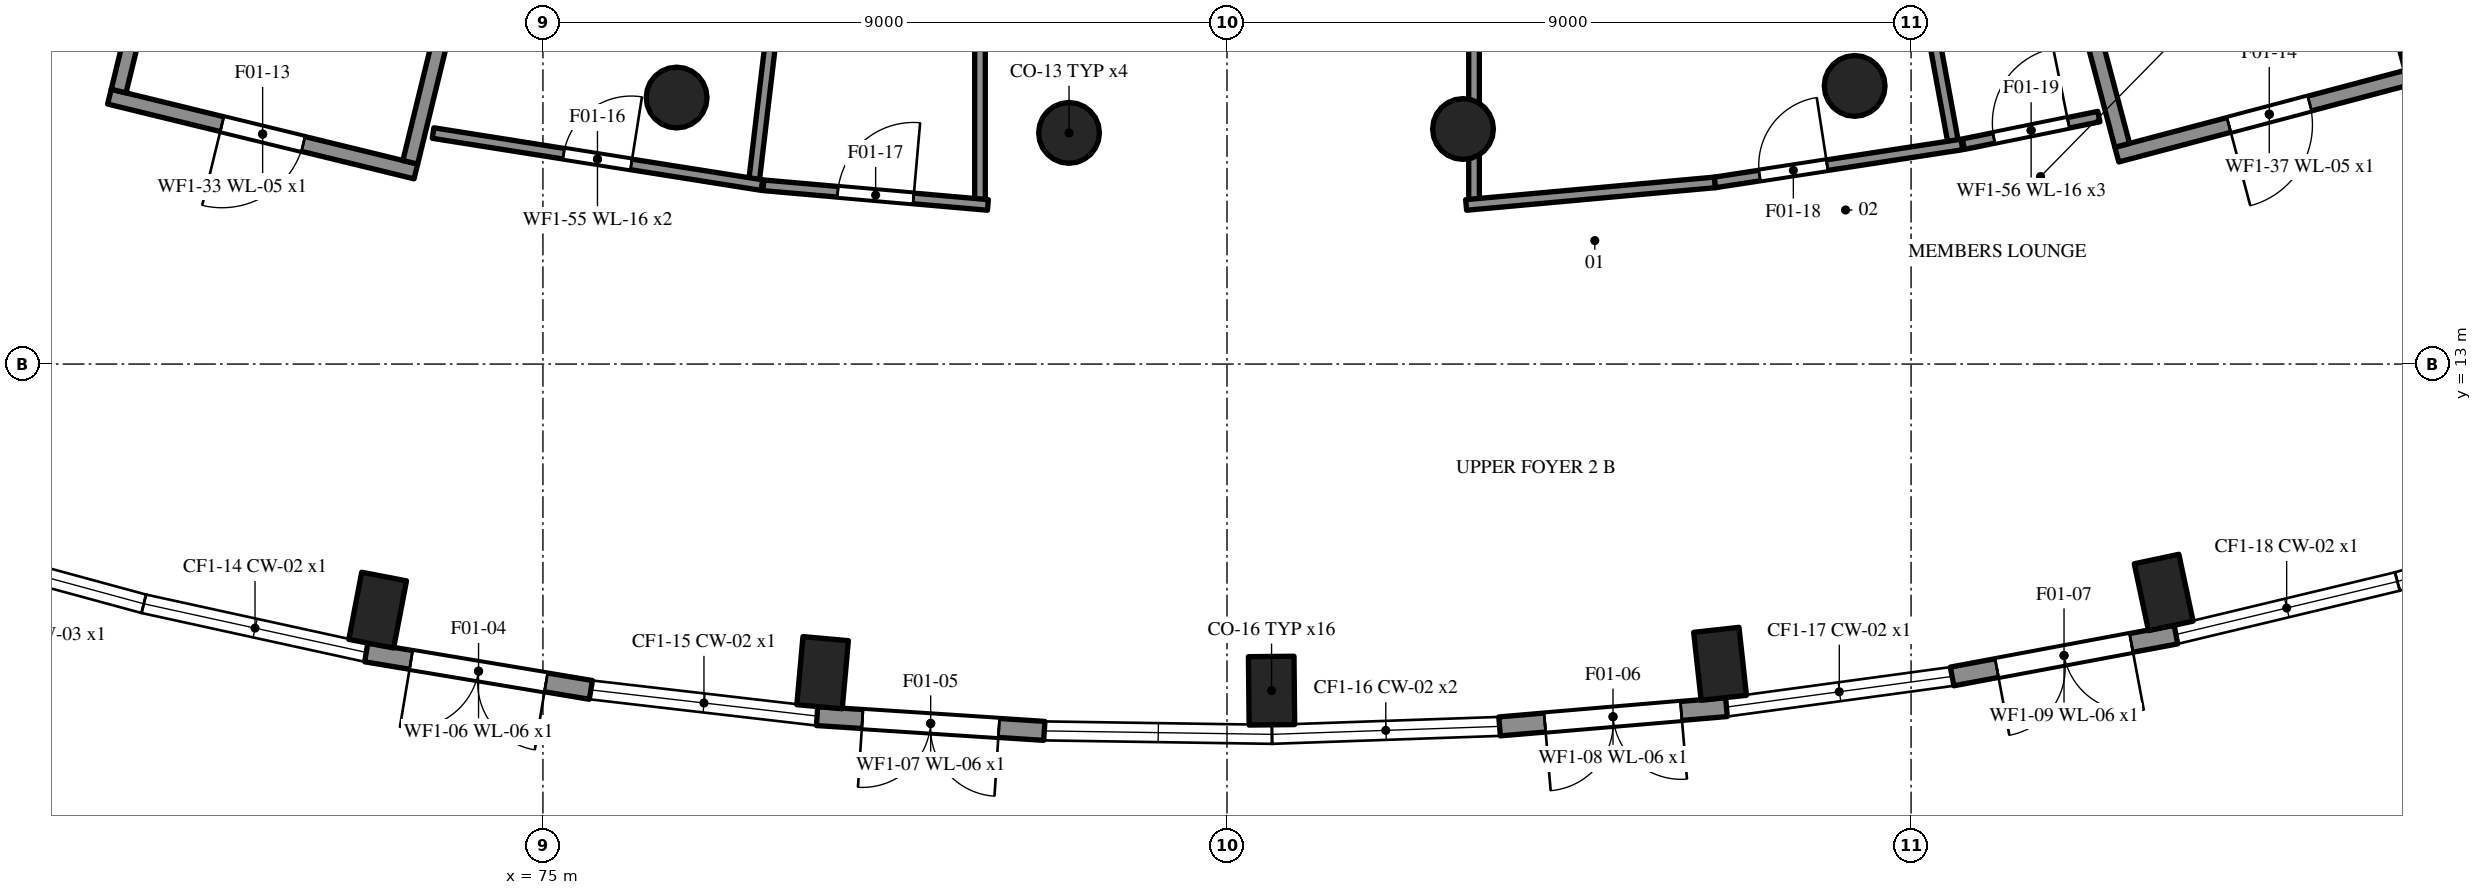
"""IFC4 building model, lengths in metres.
Left out: names, types, materials, properties, quantities, classifications, styles, units other than length and angle.
Written with IfcOpenShell. Run it as: python <this file> out.ifc"""

import sys

from ifc_helpers import new_model, si_unit, direction, frame, frame_2d, origin, origin_2d, place, context, subcontext, project, spatial, rectangle, circle, extrude, element, fill, save


model = new_model("IFC4")
c1 = context("Model", 3, precision=1e-05, world=origin(), true_north=direction((0.0, 1.0)))
c2 = subcontext(c1, "Body", "Model", "MODEL_VIEW")
j1 = project(units=[si_unit("LENGTHUNIT", "METRE"), si_unit("PLANEANGLEUNIT", "RADIAN")], contexts=[c1])
p1 = place(None, origin())
s1 = spatial("IfcSite", under=j1, at=p1, CompositionType="ELEMENT")
p2 = place(p1, origin())
s2 = spatial("IfcBuilding", under=s1, at=p2, CompositionType="ELEMENT")
p3 = place(p2, frame((0.0, 0.0, 5.4)))
s3 = spatial("IfcBuildingStorey", under=s2, at=p3, CompositionType="ELEMENT", Elevation=5.4)
for number, where, z_axis, x_axis in (
    (1, (72.826, 9.762, 0.0), (0.0, 0.0, 1.0), (-0.188, -0.982, 0.0)),
    (2, (78.679, 8.939, 0.0), (0.0, 0.0, 1.0), (-0.09, -0.996, 0.0)),
    (3, (84.586, 8.703, 0.0), (0.0, 0.0, 1.0), (0.01, -1.0, 0.0)),
    (4, (90.487, 9.056, 0.0), (0.0, 0.0, 1.0), (0.109, -0.994, 0.0)),
    (5, (96.323, 9.995, 0.0), (0.0, 0.0, 1.0), (0.208, -0.978, 0.0)),
):
    element("IfcColumn", number, at=place(p3, frame(where, z_axis=z_axis, x_axis=x_axis)), inside=s3, PredefinedType="PILASTER", context=c2, shape_type="SweptSolid", body=[
        extrude(rectangle(XDim=0.9, YDim=0.6, at=origin_2d()), origin(), (0.0, 0.0, 1.0), 4.8),
    ])
for number, where, z_axis, x_axis in (
    (6, (76.759, 16.507, 0.0), (0.0, 0.0, 1.0), (1.0, 0.0, 0.0)),
    (7, (81.922, 16.042, 0.0), (0.0, 0.0, 1.0), (1.0, 0.0, 0.0)),
    (8, (87.105, 16.093, 0.0), (0.0, 0.0, 1.0), (1.0, 0.0, 0.0)),
    (9, (92.258, 16.66, 0.0), (0.0, 0.0, 1.0), (1.0, 0.0, 0.0)),
):
    element("IfcColumn", number, at=place(p3, frame(where, z_axis=z_axis, x_axis=x_axis)), inside=s3, PredefinedType="COLUMN", context=c2, shape_type="SweptSolid", body=[
        extrude(circle(Radius=0.4, at=origin_2d()), origin(), (0.0, 0.0, 1.0), 4.8),
    ])
p4 = place(p3, frame((72.675, 9.206, 0.0), z_axis=(0.0, 0.0, 1.0), x_axis=(0.986371890278, -0.164531134044, 0.0)))
e10 = element("IfcWall", 10, at=p4, inside=s3, PredefinedType="SHEAR", context=c2, shape_type="SweptSolid", body=[
    extrude(rectangle(XDim=2.996, YDim=0.25, at=frame_2d((1.498, 0.0))), origin(), (0.0, 0.0, 1.0), 4.8),
])
p5 = place(p4, frame((0.598, 0.0, 0.0)))
e11 = element("IfcOpeningElement", 11, at=p5, cuts=e10, PredefinedType="OPENING", context=c2, shape_type="SweptSolid", body=[
    extrude(rectangle(XDim=1.8, YDim=2.1, at=frame_2d((0.9, 1.05))), frame((0.0, 0.135, 0.0), z_axis=(0.0, -1.0, 0.0), x_axis=(1.0, 0.0, 0.0)), (0.0, 0.0, 1.0), 0.27),
])
p6 = place(p3, frame((78.606, 8.368, 0.0), z_axis=(0.0, 0.0, 1.0), x_axis=(0.99787826494, -0.065107360255, 0.0)))
e12 = element("IfcWall", 12, at=p6, inside=s3, PredefinedType="SHEAR", context=c2, shape_type="SweptSolid", body=[
    extrude(rectangle(XDim=2.996, YDim=0.25, at=frame_2d((1.498, 0.0))), origin(), (0.0, 0.0, 1.0), 4.8),
])
p7 = place(p6, frame((0.598, 0.0, 0.0)))
e13 = element("IfcOpeningElement", 13, at=p7, cuts=e12, PredefinedType="OPENING", context=c2, shape_type="SweptSolid", body=[
    extrude(rectangle(XDim=1.8, YDim=2.1, at=frame_2d((0.9, 1.05))), frame((0.0, 0.135, 0.0), z_axis=(0.0, -1.0, 0.0), x_axis=(1.0, 0.0, 0.0)), (0.0, 0.0, 1.0), 0.27),
])
p8 = place(p3, frame((87.586, 8.232, 0.0), z_axis=(0.0, 0.0, 1.0), x_axis=(0.996388331705, 0.08491344088, 0.0)))
e14 = element("IfcWall", 14, at=p8, inside=s3, PredefinedType="SHEAR", context=c2, shape_type="SweptSolid", body=[
    extrude(rectangle(XDim=2.996, YDim=0.25, at=frame_2d((1.498, 0.0))), origin(), (0.0, 0.0, 1.0), 4.8),
])
p9 = place(p8, frame((0.598, 0.0, 0.0)))
e15 = element("IfcOpeningElement", 15, at=p9, cuts=e14, PredefinedType="OPENING", context=c2, shape_type="SweptSolid", body=[
    extrude(rectangle(XDim=1.8, YDim=2.1, at=frame_2d((0.9, 1.05))), frame((0.0, 0.135, 0.0), z_axis=(0.0, -1.0, 0.0), x_axis=(1.0, 0.0, 0.0)), (0.0, 0.0, 1.0), 0.27),
])
p10 = place(p3, frame((93.54, 8.89, 0.0), z_axis=(0.0, 0.0, 1.0), x_axis=(0.982925651783, 0.184003160481, 0.0)))
e16 = element("IfcWall", 16, at=p10, inside=s3, PredefinedType="SHEAR", context=c2, shape_type="SweptSolid", body=[
    extrude(rectangle(XDim=2.996, YDim=0.25, at=frame_2d((1.498, 0.0))), origin(), (0.0, 0.0, 1.0), 4.8),
])
p11 = place(p10, frame((0.598, 0.0, 0.0)))
e17 = element("IfcOpeningElement", 17, at=p11, cuts=e16, PredefinedType="OPENING", context=c2, shape_type="SweptSolid", body=[
    extrude(rectangle(XDim=1.8, YDim=2.1, at=frame_2d((0.9, 1.05))), frame((0.0, 0.135, 0.0), z_axis=(0.0, -1.0, 0.0), x_axis=(1.0, 0.0, 0.0)), (0.0, 0.0, 1.0), 0.27),
])
p12 = place(p3, frame((73.328, 15.534, 0.0), z_axis=(0.0, 0.0, 1.0), x_axis=(-0.97147374422, 0.237147136374, 0.0)))
e18 = element("IfcWall", 18, at=p12, inside=s3, PredefinedType="SHEAR", context=c2, shape_type="SweptSolid", body=[
    extrude(rectangle(XDim=4.15, YDim=0.2, at=frame_2d((2.075, 0.0))), origin(), (0.0, 0.0, 1.0), 4.8),
])
p13 = place(p12, frame((1.525, 0.0, 0.0)))
e19 = element("IfcOpeningElement", 19, at=p13, cuts=e18, PredefinedType="OPENING", context=c2, shape_type="SweptSolid", body=[
    extrude(rectangle(XDim=1.1, YDim=2.1, at=frame_2d((0.55, 1.05))), frame((0.0, 0.11, 0.0), z_axis=(0.0, -1.0, 0.0), x_axis=(1.0, 0.0, 0.0)), (0.0, 0.0, 1.0), 0.22),
])
p14 = place(p3, frame((73.255, 15.655, 0.0), z_axis=(0.0, 0.0, 1.0), x_axis=(0.237142809453, 0.971474800458, 0.0)))
e20 = element("IfcWall", 20, at=p14, inside=s3, PredefinedType="SHEAR", context=c2, shape_type="SweptSolid", body=[
    extrude(rectangle(XDim=7.92, YDim=0.2, at=frame_2d((3.96, 0.0))), origin(), (0.0, 0.0, 1.0), 4.8),
])
p15 = place(p3, frame((69.417, 16.592, 0.0), z_axis=(0.0, 0.0, 1.0), x_axis=(0.2371535898, 0.971472168847, 0.0)))
e21 = element("IfcWall", 21, at=p15, inside=s3, PredefinedType="SHEAR", context=c2, shape_type="SweptSolid", body=[
    extrude(rectangle(XDim=8.0, YDim=0.2, at=frame_2d((4.0, 0.0))), origin(), (0.0, 0.0, 1.0), 4.8),
])
p16 = place(p3, frame((99.718, 16.819, 0.0), z_axis=(0.0, 0.0, 1.0), x_axis=(-0.966590417756, -0.256325894715, 0.0)))
e22 = element("IfcWall", 22, at=p16, inside=s3, PredefinedType="SHEAR", context=c2, shape_type="SweptSolid", body=[
    extrude(rectangle(XDim=4.15, YDim=0.2, at=frame_2d((2.075, 0.0))), origin(), (0.0, 0.0, 1.0), 4.8),
])
p17 = place(p16, frame((1.525, 0.0, 0.0)))
e23 = element("IfcOpeningElement", 23, at=p17, cuts=e22, PredefinedType="OPENING", context=c2, shape_type="SweptSolid", body=[
    extrude(rectangle(XDim=1.1, YDim=2.1, at=frame_2d((0.55, 1.05))), frame((0.0, 0.11, 0.0), z_axis=(0.0, -1.0, 0.0), x_axis=(1.0, 0.0, 0.0)), (0.0, 0.0, 1.0), 0.22),
])
p18 = place(p3, frame((99.596, 16.89, 0.0), z_axis=(0.0, 0.0, 1.0), x_axis=(-0.25631948932, 0.966592116352, 0.0)))
e24 = element("IfcWall", 24, at=p18, inside=s3, PredefinedType="SHEAR", context=c2, shape_type="SweptSolid", body=[
    extrude(rectangle(XDim=8.0, YDim=0.2, at=frame_2d((4.0, 0.0))), origin(), (0.0, 0.0, 1.0), 4.8),
])
p19 = place(p3, frame((95.778, 15.878, 0.0), z_axis=(0.0, 0.0, 1.0), x_axis=(-0.256333531377, 0.966588392591, 0.0)))
e25 = element("IfcWall", 25, at=p19, inside=s3, PredefinedType="SHEAR", context=c2, shape_type="SweptSolid", body=[
    extrude(rectangle(XDim=7.73, YDim=0.2, at=frame_2d((3.865, 0.0))), origin(), (0.0, 0.0, 1.0), 4.8),
])
p20 = place(p3, frame((78.243, 19.342, 0.0), z_axis=(0.0, 0.0, 1.0), x_axis=(-0.117462752038, -0.993077288978, 0.0)))
e26 = element("IfcWall", 26, at=p20, inside=s3, PredefinedType="PARTITIONING", context=c2, shape_type="SweptSolid", body=[
    extrude(rectangle(XDim=3.943, YDim=0.14, at=frame_2d((1.971, 0.0))), origin(), (0.0, 0.0, 1.0), 4.58),
])
p21 = place(p3, frame((92.879, 19.594, 0.0), z_axis=(0.0, 0.0, 1.0), x_axis=(0.18037858071, -0.983597258852, 0.0)))
e27 = element("IfcWall", 27, at=p21, inside=s3, PredefinedType="PARTITIONING", context=c2, shape_type="SweptSolid", body=[
    extrude(rectangle(XDim=3.726, YDim=0.14, at=frame_2d((1.863, 0.0))), origin(), (0.0, 0.0, 1.0), 4.58),
])
for number, where, z_axis, x_axis in (
    (28, (80.75, 15.163, 0.0), (0.0, 0.0, 1.0), (0.0, 1.0, 0.0)),
    (29, (87.25, 15.163, 0.0), (0.0, 0.0, 1.0), (0.0, 1.0, 0.0)),
):
    element("IfcWall", number, at=place(p3, frame(where, z_axis=z_axis, x_axis=x_axis)), inside=s3, PredefinedType="PARTITIONING", context=c2, shape_type="SweptSolid", body=[
        extrude(rectangle(XDim=2.967, YDim=0.14, at=frame_2d((1.484, 0.0))), origin(), (0.0, 0.0, 1.0), 4.58),
    ])
p22 = place(p3, frame((73.554, 16.04, 0.0), z_axis=(0.0, 0.0, 1.0), x_axis=(0.987693268679, -0.156403347173, 0.0)))
e30 = element("IfcWall", 30, at=p22, inside=s3, PredefinedType="PARTITIONING", context=c2, shape_type="SweptSolid", body=[
    extrude(rectangle(XDim=4.38, YDim=0.14, at=frame_2d((2.19, 0.0))), origin(), (0.0, 0.0, 1.0), 4.58),
])
p23 = place(p22, frame((1.74, 0.0, 0.0)))
e31 = element("IfcOpeningElement", 31, at=p23, cuts=e30, PredefinedType="OPENING", context=c2, shape_type="SweptSolid", body=[
    extrude(rectangle(XDim=0.9, YDim=2.1, at=frame_2d((0.45, 1.05))), frame((0.0, 0.08, 0.0), z_axis=(0.0, -1.0, 0.0), x_axis=(1.0, 0.0, 0.0)), (0.0, 0.0, 1.0), 0.16),
])
p24 = place(p3, frame((77.9, 15.352, 0.0), z_axis=(0.0, 0.0, 1.0), x_axis=(0.996183521579, -0.087283396667, 0.0)))
e32 = element("IfcWall", 32, at=p24, inside=s3, PredefinedType="PARTITIONING", context=c2, shape_type="SweptSolid", body=[
    extrude(rectangle(XDim=2.965, YDim=0.14, at=frame_2d((1.482, 0.0))), origin(), (0.0, 0.0, 1.0), 4.58),
])
p25 = place(p24, frame((0.982, 0.0, 0.0)))
e33 = element("IfcOpeningElement", 33, at=p25, cuts=e32, PredefinedType="OPENING", context=c2, shape_type="SweptSolid", body=[
    extrude(rectangle(XDim=1.0, YDim=2.1, at=frame_2d((0.5, 1.05))), frame((0.0, 0.08, 0.0), z_axis=(0.0, -1.0, 0.0), x_axis=(1.0, 0.0, 0.0)), (0.0, 0.0, 1.0), 0.16),
])
p26 = place(p3, frame((87.146, 15.094, 0.0), z_axis=(0.0, 0.0, 1.0), x_axis=(0.995913271916, 0.090314754169, 0.0)))
e34 = element("IfcWall", 34, at=p26, inside=s3, PredefinedType="PARTITIONING", context=c2, shape_type="SweptSolid", body=[
    extrude(rectangle(XDim=3.287, YDim=0.14, at=frame_2d((1.644, 0.0))), origin(), (0.0, 0.0, 1.0), 4.58),
])
p27 = place(p3, frame((90.42, 15.39, 0.0), z_axis=(0.0, 0.0, 1.0), x_axis=(0.988407735118, 0.151822755736, 0.0)))
e35 = element("IfcWall", 35, at=p27, inside=s3, PredefinedType="PARTITIONING", context=c2, shape_type="SweptSolid", body=[
    extrude(rectangle(XDim=3.287, YDim=0.14, at=frame_2d((1.644, 0.0))), origin(), (0.0, 0.0, 1.0), 4.58),
])
p28 = place(p27, frame((0.594, 0.0, 0.0)))
e36 = element("IfcOpeningElement", 36, at=p28, cuts=e35, PredefinedType="OPENING", context=c2, shape_type="SweptSolid", body=[
    extrude(rectangle(XDim=0.9, YDim=2.1, at=frame_2d((0.45, 1.05))), frame((0.0, 0.08, 0.0), z_axis=(0.0, -1.0, 0.0), x_axis=(1.0, 0.0, 0.0)), (0.0, 0.0, 1.0), 0.16),
])
p29 = place(p3, frame((93.688, 15.893, 0.0), z_axis=(0.0, 0.0, 1.0), x_axis=(0.979888212279, 0.199547216058, 0.0)))
e37 = element("IfcWall", 37, at=p29, inside=s3, PredefinedType="PARTITIONING", context=c2, shape_type="SweptSolid", body=[
    extrude(rectangle(XDim=1.819, YDim=0.14, at=frame_2d((0.91, 0.0))), origin(), (0.0, 0.0, 1.0), 4.58),
])
p30 = place(p29, frame((0.41, 0.0, 0.0)))
e38 = element("IfcOpeningElement", 38, at=p30, cuts=e37, PredefinedType="OPENING", context=c2, shape_type="SweptSolid", body=[
    extrude(rectangle(XDim=1.0, YDim=2.1, at=frame_2d((0.5, 1.05))), frame((0.0, 0.08, 0.0), z_axis=(0.0, -1.0, 0.0), x_axis=(1.0, 0.0, 0.0)), (0.0, 0.0, 1.0), 0.16),
])
p31 = place(p5, frame((1.8, 0.0, 0.0), z_axis=(0.0, 0.0, 1.0), x_axis=(-1.0, 0.0, 0.0)))
e39 = element("IfcDoor", 39, at=p31, inside=s3, OperationType="DOUBLE_DOOR_SINGLE_SWING", PredefinedType="DOOR", context=c2, shape_type="SweptSolid", body=[
    extrude(rectangle(XDim=1.8, YDim=2.1, at=frame_2d((0.9, 1.05))), frame((0.0, 0.025, 0.0), z_axis=(0.0, -1.0, 0.0), x_axis=(1.0, 0.0, 0.0)), (0.0, 0.0, 1.0), 0.05),
])
fill(e11, e39)
p32 = place(p7, frame((1.8, 0.0, 0.0), z_axis=(0.0, 0.0, 1.0), x_axis=(-1.0, 0.0, 0.0)))
e40 = element("IfcDoor", 40, at=p32, inside=s3, OperationType="DOUBLE_DOOR_SINGLE_SWING", PredefinedType="DOOR", context=c2, shape_type="SweptSolid", body=[
    extrude(rectangle(XDim=1.8, YDim=2.1, at=frame_2d((0.9, 1.05))), frame((0.0, 0.025, 0.0), z_axis=(0.0, -1.0, 0.0), x_axis=(1.0, 0.0, 0.0)), (0.0, 0.0, 1.0), 0.05),
])
fill(e13, e40)
p33 = place(p9, frame((1.8, 0.0, 0.0), z_axis=(0.0, 0.0, 1.0), x_axis=(-1.0, 0.0, 0.0)))
e41 = element("IfcDoor", 41, at=p33, inside=s3, OperationType="DOUBLE_DOOR_SINGLE_SWING", PredefinedType="DOOR", context=c2, shape_type="SweptSolid", body=[
    extrude(rectangle(XDim=1.8, YDim=2.1, at=frame_2d((0.9, 1.05))), frame((0.0, 0.025, 0.0), z_axis=(0.0, -1.0, 0.0), x_axis=(1.0, 0.0, 0.0)), (0.0, 0.0, 1.0), 0.05),
])
fill(e15, e41)
p34 = place(p11, frame((1.8, 0.0, 0.0), z_axis=(0.0, 0.0, 1.0), x_axis=(-1.0, 0.0, 0.0)))
e42 = element("IfcDoor", 42, at=p34, inside=s3, OperationType="DOUBLE_DOOR_SINGLE_SWING", PredefinedType="DOOR", context=c2, shape_type="SweptSolid", body=[
    extrude(rectangle(XDim=1.8, YDim=2.1, at=frame_2d((0.9, 1.05))), frame((0.0, 0.025, 0.0), z_axis=(0.0, -1.0, 0.0), x_axis=(1.0, 0.0, 0.0)), (0.0, 0.0, 1.0), 0.05),
])
fill(e17, e42)
p35 = place(p13, origin())
e43 = element("IfcDoor", 43, at=p35, inside=s3, OperationType="SINGLE_SWING_RIGHT", PredefinedType="DOOR", context=c2, shape_type="SweptSolid", body=[
    extrude(rectangle(XDim=1.1, YDim=2.1, at=frame_2d((0.55, 1.05))), frame((0.0, 0.025, 0.0), z_axis=(0.0, -1.0, 0.0), x_axis=(1.0, 0.0, 0.0)), (0.0, 0.0, 1.0), 0.05),
])
fill(e19, e43)
p36 = place(p17, origin())
e44 = element("IfcDoor", 44, at=p36, inside=s3, OperationType="SINGLE_SWING_RIGHT", PredefinedType="DOOR", context=c2, shape_type="SweptSolid", body=[
    extrude(rectangle(XDim=1.1, YDim=2.1, at=frame_2d((0.55, 1.05))), frame((0.0, 0.025, 0.0), z_axis=(0.0, -1.0, 0.0), x_axis=(1.0, 0.0, 0.0)), (0.0, 0.0, 1.0), 0.05),
])
fill(e23, e44)
p37 = place(p23, origin())
e45 = element("IfcDoor", 45, at=p37, inside=s3, OperationType="SINGLE_SWING_RIGHT", PredefinedType="DOOR", context=c2, shape_type="SweptSolid", body=[
    extrude(rectangle(XDim=0.9, YDim=2.1, at=frame_2d((0.45, 1.05))), frame((0.0, 0.025, 0.0), z_axis=(0.0, -1.0, 0.0), x_axis=(1.0, 0.0, 0.0)), (0.0, 0.0, 1.0), 0.05),
])
fill(e31, e45)
p38 = place(p25, origin())
e46 = element("IfcDoor", 46, at=p38, inside=s3, OperationType="SINGLE_SWING_RIGHT", PredefinedType="DOOR", context=c2, shape_type="SweptSolid", body=[
    extrude(rectangle(XDim=1.0, YDim=2.1, at=frame_2d((0.5, 1.05))), frame((0.0, 0.025, 0.0), z_axis=(0.0, -1.0, 0.0), x_axis=(1.0, 0.0, 0.0)), (0.0, 0.0, 1.0), 0.05),
])
fill(e33, e46)
p39 = place(p28, origin())
e47 = element("IfcDoor", 47, at=p39, inside=s3, OperationType="SINGLE_SWING_RIGHT", PredefinedType="DOOR", context=c2, shape_type="SweptSolid", body=[
    extrude(rectangle(XDim=0.9, YDim=2.1, at=frame_2d((0.45, 1.05))), frame((0.0, 0.025, 0.0), z_axis=(0.0, -1.0, 0.0), x_axis=(1.0, 0.0, 0.0)), (0.0, 0.0, 1.0), 0.05),
])
fill(e36, e47)
p40 = place(p30, origin())
e48 = element("IfcDoor", 48, at=p40, inside=s3, OperationType="SINGLE_SWING_RIGHT", PredefinedType="DOOR", context=c2, shape_type="SweptSolid", body=[
    extrude(rectangle(XDim=1.0, YDim=2.1, at=frame_2d((0.5, 1.05))), frame((0.0, 0.025, 0.0), z_axis=(0.0, -1.0, 0.0), x_axis=(1.0, 0.0, 0.0)), (0.0, 0.0, 1.0), 0.05),
])
fill(e38, e48)
save(model, sys.argv[1])
